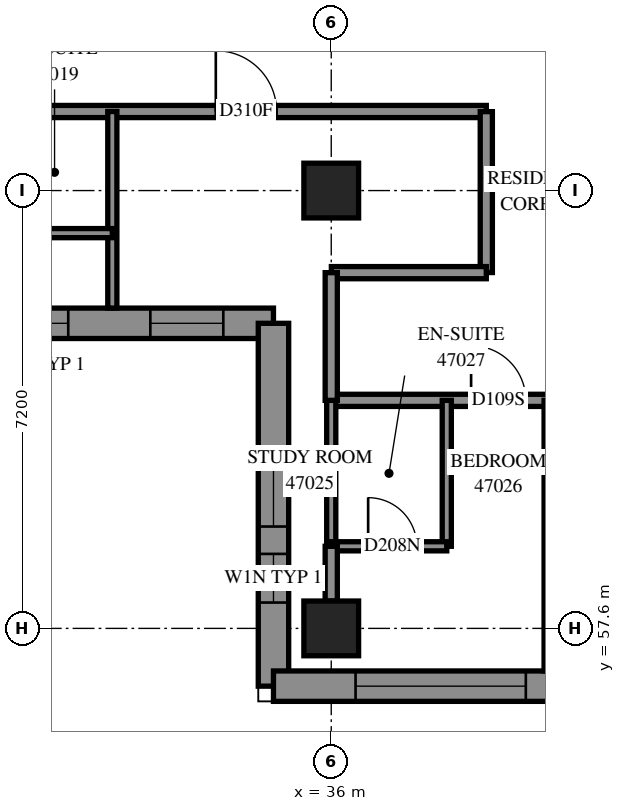
"""IFC4 building model, lengths in metres.
Left out: names, types, materials, properties, quantities, classifications, styles, units other than length and angle.
Written with IfcOpenShell. Run it as: python <this file> out.ifc"""

import sys

from ifc_helpers import new_model, si_unit, direction, frame, frame_2d, origin, origin_2d, place, context, subcontext, project, spatial, polyline, rectangle, outline, extrude, element, fill, save


model = new_model("IFC4")
c1 = context("Model", 3, precision=1e-05, world=origin(), true_north=direction((0.0, 1.0)))
c2 = subcontext(c1, "Body", "Model", "MODEL_VIEW")
j1 = project(units=[si_unit("LENGTHUNIT", "METRE"), si_unit("PLANEANGLEUNIT", "RADIAN")], contexts=[c1])
p1 = place(None, origin())
s1 = spatial("IfcSite", under=j1, at=p1, CompositionType="ELEMENT")
p2 = place(p1, origin())
s2 = spatial("IfcBuilding", under=s1, at=p2, CompositionType="ELEMENT")
p3 = place(p2, frame((0.0, 0.0, 172.8)))
s3 = spatial("IfcBuildingStorey", under=s2, at=p3, CompositionType="ELEMENT", Elevation=172.8)
for number, where, z_axis, x_axis in (
    (1, (36.0, 57.6, 0.0), (0.0, 0.0, 1.0), (1.0, 0.0, 0.0)),
    (2, (36.0, 64.8, 0.0), (0.0, 0.0, 1.0), (1.0, 0.0, 0.0)),
):
    element("IfcColumn", number, at=place(p3, frame(where, z_axis=z_axis, x_axis=x_axis)), inside=s3, PredefinedType="COLUMN", context=c2, shape_type="SweptSolid", body=[
        extrude(rectangle(XDim=0.9, YDim=0.9, at=origin_2d()), origin(), (0.0, 0.0, 1.0), 3.1),
    ])
p4 = place(p3, frame((19.417, 62.617, 0.0), z_axis=(0.0, 0.0, 1.0), x_axis=(1.0, 0.0, 0.0)))
e3 = element("IfcWall", 3, at=p4, inside=s3, PredefinedType="SOLIDWALL", context=c2, shape_type="SweptSolid", body=[
    extrude(outline(polyline([(-0.25, -0.25), (15.383, -0.25), (15.883, 0.25), (0.25, 0.25), (-0.25, -0.25)])), origin(), (0.0, 0.0, 1.0), 3.1),
])
p5 = place(p4, frame((2.583, 0.0, 0.45)))
e4 = element("IfcOpeningElement", 4, at=p5, cuts=e3, PredefinedType="OPENING", context=c2, shape_type="SweptSolid", body=[
    extrude(rectangle(XDim=2.8, YDim=2.5, at=frame_2d((1.4, 1.25))), frame((0.0, 0.26, 0.0), z_axis=(0.0, -1.0, 0.0), x_axis=(1.0, 0.0, 0.0)), (0.0, 0.0, 1.0), 0.52),
])
p6 = place(p4, frame((6.183, 0.0, 0.45)))
e5 = element("IfcOpeningElement", 5, at=p6, cuts=e3, PredefinedType="OPENING", context=c2, shape_type="SweptSolid", body=[
    extrude(rectangle(XDim=2.8, YDim=2.5, at=frame_2d((1.4, 1.25))), frame((0.0, 0.26, 0.0), z_axis=(0.0, -1.0, 0.0), x_axis=(1.0, 0.0, 0.0)), (0.0, 0.0, 1.0), 0.52),
])
p7 = place(p4, frame((0.717, 0.0, 0.45)))
e6 = element("IfcOpeningElement", 6, at=p7, cuts=e3, PredefinedType="OPENING", context=c2, shape_type="SweptSolid", body=[
    extrude(rectangle(XDim=1.2, YDim=2.5, at=frame_2d((0.6, 1.25))), frame((0.0, 0.26, 0.0), z_axis=(0.0, -1.0, 0.0), x_axis=(1.0, 0.0, 0.0)), (0.0, 0.0, 1.0), 0.52),
])
p8 = place(p4, frame((13.608, 0.0, 0.45)))
e7 = element("IfcOpeningElement", 7, at=p8, cuts=e3, PredefinedType="OPENING", context=c2, shape_type="SweptSolid", body=[
    extrude(rectangle(XDim=1.2, YDim=2.5, at=frame_2d((0.6, 1.25))), frame((0.0, 0.26, 0.0), z_axis=(0.0, -1.0, 0.0), x_axis=(1.0, 0.0, 0.0)), (0.0, 0.0, 1.0), 0.52),
])
p9 = place(p4, frame((9.608, 0.0, 0.45)))
e8 = element("IfcOpeningElement", 8, at=p9, cuts=e3, PredefinedType="OPENING", context=c2, shape_type="SweptSolid", body=[
    extrude(rectangle(XDim=1.3, YDim=2.5, at=frame_2d((0.65, 1.25))), frame((0.0, 0.26, 0.0), z_axis=(0.0, -1.0, 0.0), x_axis=(1.0, 0.0, 0.0)), (0.0, 0.0, 1.0), 0.52),
])
p10 = place(p4, frame((11.258, 0.0, 0.45)))
e9 = element("IfcOpeningElement", 9, at=p10, cuts=e3, PredefinedType="OPENING", context=c2, shape_type="SweptSolid", body=[
    extrude(rectangle(XDim=1.0, YDim=2.5, at=frame_2d((0.5, 1.25))), frame((0.0, 0.26, 0.0), z_axis=(0.0, -1.0, 0.0), x_axis=(1.0, 0.0, 0.0)), (0.0, 0.0, 1.0), 0.52),
])
p11 = place(p3, frame((35.05, 62.617, 0.0), z_axis=(0.0, 0.0, 1.0), x_axis=(0.0, -1.0, 0.0)))
e10 = element("IfcWall", 10, at=p11, inside=s3, PredefinedType="SOLIDWALL", context=c2, shape_type="SweptSolid", body=[
    extrude(outline(polyline([(0.25, -0.25), (6.217, -0.25), (5.717, 0.25), (-0.25, 0.25), (0.25, -0.25)])), origin(), (0.0, 0.0, 1.0), 3.1),
])
p12 = place(p11, frame((2.042, 0.0, 0.45)))
e11 = element("IfcOpeningElement", 11, at=p12, cuts=e10, PredefinedType="OPENING", context=c2, shape_type="SweptSolid", body=[
    extrude(rectangle(XDim=1.3, YDim=2.5, at=frame_2d((0.65, 1.25))), frame((0.0, 0.26, 0.0), z_axis=(0.0, -1.0, 0.0), x_axis=(1.0, 0.0, 0.0)), (0.0, 0.0, 1.0), 0.52),
])
p13 = place(p11, frame((3.792, 0.0, 0.45)))
e12 = element("IfcOpeningElement", 12, at=p13, cuts=e10, PredefinedType="OPENING", context=c2, shape_type="SweptSolid", body=[
    extrude(rectangle(XDim=0.8, YDim=2.5, at=frame_2d((0.4, 1.25))), frame((0.0, 0.26, 0.0), z_axis=(0.0, -1.0, 0.0), x_axis=(1.0, 0.0, 0.0)), (0.0, 0.0, 1.0), 0.52),
])
p14 = place(p3, frame((35.05, 56.65, 0.0), z_axis=(0.0, 0.0, 1.0), x_axis=(1.0, 0.0, 0.0)))
e13 = element("IfcWall", 13, at=p14, inside=s3, PredefinedType="SOLIDWALL", context=c2, shape_type="SweptSolid", body=[
    extrude(outline(polyline([(-0.25, -0.25), (6.95, -0.25), (7.45, 0.25), (0.25, 0.25), (-0.25, -0.25)])), origin(), (0.0, 0.0, 1.0), 3.1),
])
p15 = place(p14, frame((1.35, 0.0, 0.45)))
e14 = element("IfcOpeningElement", 14, at=p15, cuts=e13, PredefinedType="OPENING", context=c2, shape_type="SweptSolid", body=[
    extrude(rectangle(XDim=2.8, YDim=2.5, at=frame_2d((1.4, 1.25))), frame((0.0, 0.26, 0.0), z_axis=(0.0, -1.0, 0.0), x_axis=(1.0, 0.0, 0.0)), (0.0, 0.0, 1.0), 0.52),
])
p16 = place(p14, frame((5.175, 0.0, 0.45)))
e15 = element("IfcOpeningElement", 15, at=p16, cuts=e13, PredefinedType="OPENING", context=c2, shape_type="SweptSolid", body=[
    extrude(rectangle(XDim=1.2, YDim=2.5, at=frame_2d((0.6, 1.25))), frame((0.0, 0.26, 0.0), z_axis=(0.0, -1.0, 0.0), x_axis=(1.0, 0.0, 0.0)), (0.0, 0.0, 1.0), 0.52),
])
p17 = place(p3, frame((36.0, 61.35, 0.0), z_axis=(0.0, 0.0, 1.0), x_axis=(1.0, 0.0, 0.0)))
e16 = element("IfcWall", 16, at=p17, inside=s3, PredefinedType="PARTITIONING", context=c2, shape_type="SweptSolid", body=[
    extrude(rectangle(XDim=16.95, YDim=0.2, at=frame_2d((8.475, 0.0))), origin(), (0.0, 0.0, 1.0), 3.1),
])
p18 = place(p17, frame((2.3, 0.0, 0.0)))
e17 = element("IfcOpeningElement", 17, at=p18, cuts=e16, PredefinedType="OPENING", context=c2, shape_type="SweptSolid", body=[
    extrude(rectangle(XDim=0.9, YDim=2.1, at=frame_2d((0.45, 1.05))), frame((0.0, 0.11, 0.0), z_axis=(0.0, -1.0, 0.0), x_axis=(1.0, 0.0, 0.0)), (0.0, 0.0, 1.0), 0.22),
])
p19 = place(p17, frame((4.125, 0.0, 0.0)))
e18 = element("IfcOpeningElement", 18, at=p19, cuts=e16, PredefinedType="OPENING", context=c2, shape_type="SweptSolid", body=[
    extrude(rectangle(XDim=1.0, YDim=2.1, at=frame_2d((0.5, 1.05))), frame((0.0, 0.11, 0.0), z_axis=(0.0, -1.0, 0.0), x_axis=(1.0, 0.0, 0.0)), (0.0, 0.0, 1.0), 0.22),
])
p20 = place(p17, frame((9.5, 0.0, 0.0)))
e19 = element("IfcOpeningElement", 19, at=p20, cuts=e16, PredefinedType="OPENING", context=c2, shape_type="SweptSolid", body=[
    extrude(rectangle(XDim=0.9, YDim=2.1, at=frame_2d((0.45, 1.05))), frame((0.0, 0.11, 0.0), z_axis=(0.0, -1.0, 0.0), x_axis=(1.0, 0.0, 0.0)), (0.0, 0.0, 1.0), 0.22),
])
p21 = place(p17, frame((11.635, 0.0, 0.0)))
e20 = element("IfcOpeningElement", 20, at=p21, cuts=e16, PredefinedType="OPENING", context=c2, shape_type="SweptSolid", body=[
    extrude(rectangle(XDim=1.0, YDim=2.1, at=frame_2d((0.5, 1.05))), frame((0.0, 0.11, 0.0), z_axis=(0.0, -1.0, 0.0), x_axis=(1.0, 0.0, 0.0)), (0.0, 0.0, 1.0), 0.22),
])
p22 = place(p17, frame((15.803, 0.0, 0.0)))
e21 = element("IfcOpeningElement", 21, at=p22, cuts=e16, PredefinedType="OPENING", context=c2, shape_type="SweptSolid", body=[
    extrude(rectangle(XDim=1.0, YDim=2.1, at=frame_2d((0.5, 1.05))), frame((0.0, 0.11, 0.0), z_axis=(0.0, -1.0, 0.0), x_axis=(1.0, 0.0, 0.0)), (0.0, 0.0, 1.0), 0.22),
])
p23 = place(p3, frame((21.6, 66.1, 0.0), z_axis=(0.0, 0.0, 1.0), x_axis=(1.0, 0.0, 0.0)))
e22 = element("IfcWall", 22, at=p23, inside=s3, PredefinedType="PARTITIONING", context=c2, shape_type="SweptSolid", body=[
    extrude(rectangle(XDim=16.95, YDim=0.2, at=frame_2d((8.475, 0.0))), origin(), (0.0, 0.0, 1.0), 3.1),
])
p24 = place(p23, frame((0.546, 0.0, 0.0)))
e23 = element("IfcOpeningElement", 23, at=p24, cuts=e22, PredefinedType="OPENING", context=c2, shape_type="SweptSolid", body=[
    extrude(rectangle(XDim=0.9, YDim=2.1, at=frame_2d((0.45, 1.05))), frame((0.0, 0.11, 0.0), z_axis=(0.0, -1.0, 0.0), x_axis=(1.0, 0.0, 0.0)), (0.0, 0.0, 1.0), 0.22),
])
p25 = place(p23, frame((12.502, 0.0, 0.0)))
e24 = element("IfcOpeningElement", 24, at=p25, cuts=e22, PredefinedType="OPENING", context=c2, shape_type="SweptSolid", body=[
    extrude(rectangle(XDim=1.0, YDim=2.1, at=frame_2d((0.5, 1.05))), frame((0.0, 0.11, 0.0), z_axis=(0.0, -1.0, 0.0), x_axis=(1.0, 0.0, 0.0)), (0.0, 0.0, 1.0), 0.22),
])
p26 = place(p3, frame((39.6, 56.9, 0.0), z_axis=(0.0, 0.0, 1.0), x_axis=(0.0, 1.0, 0.0)))
e25 = element("IfcWall", 25, at=p26, inside=s3, PredefinedType="PARTITIONING", context=c2, shape_type="SweptSolid", body=[
    extrude(rectangle(XDim=4.45, YDim=0.2, at=frame_2d((2.225, 0.0))), origin(), (0.0, 0.0, 1.0), 3.1),
])
p27 = place(p3, frame((32.4, 62.867, 0.0), z_axis=(0.0, 0.0, 1.0), x_axis=(0.0, 1.0, 0.0)))
e26 = element("IfcWall", 26, at=p27, inside=s3, PredefinedType="PARTITIONING", context=c2, shape_type="SweptSolid", body=[
    extrude(rectangle(XDim=3.233, YDim=0.15, at=frame_2d((1.617, 0.0))), origin(), (0.0, 0.0, 1.0), 3.1),
])
p28 = place(p3, frame((38.55, 63.452, 0.0), z_axis=(0.0, 0.0, 1.0), x_axis=(0.0, 1.0, 0.0)))
e27 = element("IfcWall", 27, at=p28, inside=s3, PredefinedType="PARTITIONING", context=c2, shape_type="SweptSolid", body=[
    extrude(rectangle(XDim=2.646, YDim=0.2, at=frame_2d((1.323, 0.0))), origin(), (0.0, 0.0, 1.0), 3.1),
])
p29 = place(p3, frame((36.002, 63.45, 0.0), z_axis=(0.0, 0.0, 1.0), x_axis=(1.0, 0.0, 0.0)))
e28 = element("IfcWall", 28, at=p29, inside=s3, PredefinedType="PARTITIONING", context=c2, shape_type="SweptSolid", body=[
    extrude(rectangle(XDim=2.548, YDim=0.2, at=frame_2d((1.274, 0.0))), origin(), (0.0, 0.0, 1.0), 3.1),
])
p30 = place(p3, frame((37.9, 58.95, 0.0), z_axis=(0.0, 0.0, 1.0), x_axis=(0.0, 1.0, 0.0)))
e29 = element("IfcWall", 29, at=p30, inside=s3, PredefinedType="PARTITIONING", context=c2, shape_type="SweptSolid", body=[
    extrude(rectangle(XDim=2.4, YDim=0.15, at=frame_2d((1.2, 0.0))), origin(), (0.0, 0.0, 1.0), 3.1),
])
p31 = place(p3, frame((36.0, 58.95, 0.0), z_axis=(0.0, 0.0, 1.0), x_axis=(0.0, 1.0, 0.0)))
e30 = element("IfcWall", 30, at=p31, inside=s3, PredefinedType="PARTITIONING", context=c2, shape_type="SweptSolid", body=[
    extrude(rectangle(XDim=2.4, YDim=0.15, at=frame_2d((1.2, 0.0))), origin(), (0.0, 0.0, 1.0), 2.6),
])
p32 = place(p3, frame((36.0, 61.35, 0.0), z_axis=(0.0, 0.0, 1.0), x_axis=(0.0, 1.0, 0.0)))
e31 = element("IfcWall", 31, at=p32, inside=s3, PredefinedType="PARTITIONING", context=c2, shape_type="SweptSolid", body=[
    extrude(rectangle(XDim=2.1, YDim=0.2, at=frame_2d((1.05, 0.0))), origin(), (0.0, 0.0, 1.0), 2.6),
])
p33 = place(p3, frame((30.5, 64.1, 0.0), z_axis=(0.0, 0.0, 1.0), x_axis=(1.0, 0.0, 0.0)))
e32 = element("IfcWall", 32, at=p33, inside=s3, PredefinedType="PARTITIONING", context=c2, shape_type="SweptSolid", body=[
    extrude(rectangle(XDim=1.9, YDim=0.15, at=frame_2d((0.95, 0.0))), origin(), (0.0, 0.0, 1.0), 3.1),
])
p34 = place(p3, frame((36.0, 58.95, 0.0), z_axis=(0.0, 0.0, 1.0), x_axis=(1.0, 0.0, 0.0)))
e33 = element("IfcWall", 33, at=p34, inside=s3, PredefinedType="PARTITIONING", context=c2, shape_type="SweptSolid", body=[
    extrude(rectangle(XDim=1.9, YDim=0.15, at=frame_2d((0.95, 0.0))), origin(), (0.0, 0.0, 1.0), 3.1),
])
p35 = place(p34, frame((0.607, 0.0, 0.0)))
e34 = element("IfcOpeningElement", 34, at=p35, cuts=e33, PredefinedType="OPENING", context=c2, shape_type="SweptSolid", body=[
    extrude(rectangle(XDim=0.8, YDim=2.1, at=frame_2d((0.4, 1.05))), frame((0.0, 0.085, 0.0), z_axis=(0.0, -1.0, 0.0), x_axis=(1.0, 0.0, 0.0)), (0.0, 0.0, 1.0), 0.17),
])
p36 = place(p3, frame((36.0, 58.05, 0.0), z_axis=(0.0, 0.0, 1.0), x_axis=(0.0, 1.0, 0.0)))
e35 = element("IfcWall", 35, at=p36, inside=s3, PredefinedType="PARTITIONING", context=c2, shape_type="SweptSolid", body=[
    extrude(rectangle(XDim=0.9, YDim=0.2, at=frame_2d((0.45, 0.0))), origin(), (0.0, 0.0, 1.0), 2.6),
])
p37 = place(p8, origin())
e36 = element("IfcWindow", 36, at=p37, inside=s3, PartitioningType="SINGLE_PANEL", PredefinedType="WINDOW", context=c2, shape_type="SweptSolid", body=[
    extrude(rectangle(XDim=1.2, YDim=2.5, at=frame_2d((0.6, 1.25))), frame((0.0, 0.18, 0.0), z_axis=(0.0, -1.0, 0.0), x_axis=(1.0, 0.0, 0.0)), (0.0, 0.0, 1.0), 0.06),
])
fill(e7, e36)
p38 = place(p15, origin())
e37 = element("IfcWindow", 37, at=p38, inside=s3, PartitioningType="SINGLE_PANEL", PredefinedType="WINDOW", context=c2, shape_type="SweptSolid", body=[
    extrude(rectangle(XDim=2.8, YDim=2.5, at=frame_2d((1.4, 1.25))), frame((0.0, 0.18, 0.0), z_axis=(0.0, -1.0, 0.0), x_axis=(1.0, 0.0, 0.0)), (0.0, 0.0, 1.0), 0.06),
])
fill(e14, e37)
p39 = place(p25, origin())
e38 = element("IfcDoor", 38, at=p39, inside=s3, OperationType="SINGLE_SWING_RIGHT", PredefinedType="DOOR", context=c2, shape_type="SweptSolid", body=[
    extrude(rectangle(XDim=1.0, YDim=2.1, at=frame_2d((0.5, 1.05))), frame((0.0, 0.025, 0.0), z_axis=(0.0, -1.0, 0.0), x_axis=(1.0, 0.0, 0.0)), (0.0, 0.0, 1.0), 0.05),
])
fill(e24, e38)
p40 = place(p18, origin())
e39 = element("IfcDoor", 39, at=p40, inside=s3, OperationType="SINGLE_SWING_LEFT", PredefinedType="DOOR", context=c2, shape_type="SweptSolid", body=[
    extrude(rectangle(XDim=0.9, YDim=2.1, at=frame_2d((0.45, 1.05))), frame((0.0, 0.025, 0.0), z_axis=(0.0, -1.0, 0.0), x_axis=(1.0, 0.0, 0.0)), (0.0, 0.0, 1.0), 0.05),
])
fill(e17, e39)
p41 = place(p35, origin())
e40 = element("IfcDoor", 40, at=p41, inside=s3, OperationType="SINGLE_SWING_RIGHT", PredefinedType="DOOR", context=c2, shape_type="SweptSolid", body=[
    extrude(rectangle(XDim=0.8, YDim=2.1, at=frame_2d((0.4, 1.05))), frame((0.0, 0.025, 0.0), z_axis=(0.0, -1.0, 0.0), x_axis=(1.0, 0.0, 0.0)), (0.0, 0.0, 1.0), 0.05),
])
fill(e34, e40)
p42 = place(p10, origin())
e41 = element("IfcWindow", 41, at=p42, inside=s3, PartitioningType="SINGLE_PANEL", PredefinedType="WINDOW", context=c2, shape_type="SweptSolid", body=[
    extrude(rectangle(XDim=1.0, YDim=2.5, at=frame_2d((0.5, 1.25))), frame((0.0, 0.18, 0.0), z_axis=(0.0, -1.0, 0.0), x_axis=(1.0, 0.0, 0.0)), (0.0, 0.0, 1.0), 0.06),
])
fill(e9, e41)
p43 = place(p12, origin())
e42 = element("IfcWindow", 42, at=p43, inside=s3, PartitioningType="SINGLE_PANEL", PredefinedType="WINDOW", context=c2, shape_type="SweptSolid", body=[
    extrude(rectangle(XDim=1.3, YDim=2.5, at=frame_2d((0.65, 1.25))), frame((0.0, 0.18, 0.0), z_axis=(0.0, -1.0, 0.0), x_axis=(1.0, 0.0, 0.0)), (0.0, 0.0, 1.0), 0.06),
])
fill(e11, e42)
p44 = place(p13, origin())
e43 = element("IfcWindow", 43, at=p44, inside=s3, PartitioningType="SINGLE_PANEL", PredefinedType="WINDOW", context=c2, shape_type="SweptSolid", body=[
    extrude(rectangle(XDim=0.8, YDim=2.5, at=frame_2d((0.4, 1.25))), frame((0.0, 0.18, 0.0), z_axis=(0.0, -1.0, 0.0), x_axis=(1.0, 0.0, 0.0)), (0.0, 0.0, 1.0), 0.06),
])
fill(e12, e43)
save(model, sys.argv[1])
